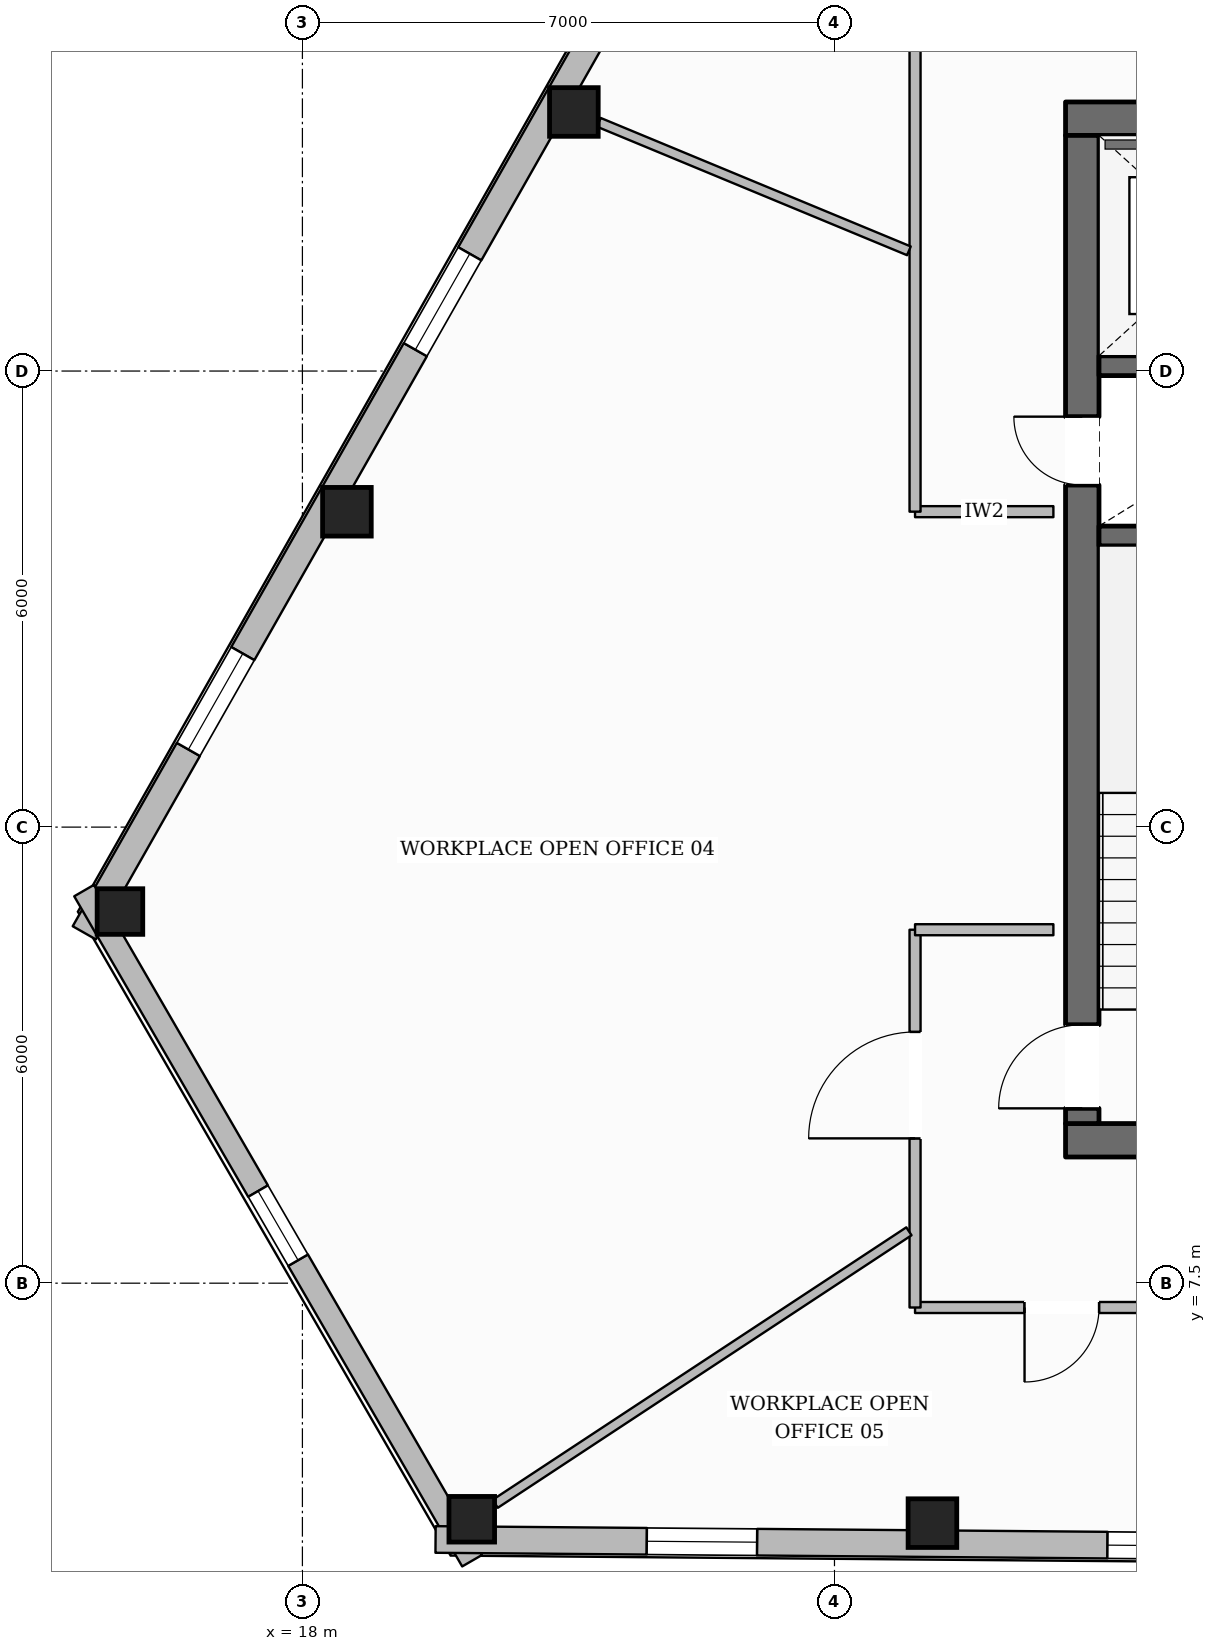
"""IFC4 building model, lengths in metres.
Left out: names, types, materials, properties, quantities, classifications, styles, units other than length and angle.
Written with IfcOpenShell. Run it as: python <this file> out.ifc"""

import sys

from ifc_helpers import new_model, si_unit, direction, frame, frame_2d, origin, origin_2d, place, context, subcontext, project, spatial, rectangle, hollow_rectangle, extrude, element, fill, save


model = new_model("IFC4")
c1 = context("Model", 3, precision=1e-05, world=origin(), true_north=direction((0.0, 1.0)))
c2 = subcontext(c1, "Body", "Model", "MODEL_VIEW")
j1 = project(units=[si_unit("LENGTHUNIT", "METRE"), si_unit("PLANEANGLEUNIT", "RADIAN")], contexts=[c1])
p1 = place(None, origin())
s1 = spatial("IfcSite", under=j1, at=p1, CompositionType="ELEMENT")
p2 = place(p1, origin())
s2 = spatial("IfcBuilding", under=s1, at=p2, CompositionType="ELEMENT")
p3 = place(p2, frame((0.0, 0.0, 176.55)))
s3 = spatial("IfcBuildingStorey", under=s2, at=p3, CompositionType="ELEMENT", Elevation=176.55)
p4 = place(p3, frame((28.04, 9.38, 0.0), z_axis=(0.0, 0.0, 1.0), x_axis=(1.0, 0.0, 0.0)))
e1 = element("IfcWall", 1, at=p4, inside=s3, PredefinedType="SOLIDWALL", context=c2, shape_type="SweptSolid", body=[
    extrude(rectangle(XDim=19.92, YDim=0.44, at=frame_2d((9.96, 0.0))), origin(), (0.0, 0.0, 1.0), 3.6),
])
p5 = place(p4, frame((10.46, 0.0, 0.0)))
e2 = element("IfcOpeningElement", 2, at=p5, cuts=e1, PredefinedType="OPENING", context=c2, shape_type="SweptSolid", body=[
    extrude(rectangle(XDim=1.4, YDim=2.2, at=frame_2d((0.7, 1.1))), frame((0.0, 0.23, 0.0), z_axis=(0.0, -1.0, 0.0), x_axis=(1.0, 0.0, 0.0)), (0.0, 0.0, 1.0), 0.46),
])
p6 = place(p3, frame((28.04, 22.82, 0.0), z_axis=(0.0, 0.0, 1.0), x_axis=(1.0, 0.0, 0.0)))
e3 = element("IfcWall", 3, at=p6, inside=s3, PredefinedType="SOLIDWALL", context=c2, shape_type="SweptSolid", body=[
    extrude(rectangle(XDim=19.92, YDim=0.44, at=frame_2d((9.96, 0.0))), origin(), (0.0, 0.0, 1.0), 3.6),
])
p7 = place(p6, frame((6.235, 0.0, 0.0)))
e4 = element("IfcOpeningElement", 4, at=p7, cuts=e3, PredefinedType="OPENING", context=c2, shape_type="SweptSolid", body=[
    extrude(rectangle(XDim=1.05, YDim=2.15, at=frame_2d((0.525, 1.075))), frame((0.0, 0.23, 0.0), z_axis=(0.0, -1.0, 0.0), x_axis=(1.0, 0.0, 0.0)), (0.0, 0.0, 1.0), 0.46),
])
p8 = place(p6, frame((12.635, 0.0, 0.0)))
e5 = element("IfcOpeningElement", 5, at=p8, cuts=e3, PredefinedType="OPENING", context=c2, shape_type="SweptSolid", body=[
    extrude(rectangle(XDim=1.05, YDim=2.15, at=frame_2d((0.525, 1.075))), frame((0.0, 0.23, 0.0), z_axis=(0.0, -1.0, 0.0), x_axis=(1.0, 0.0, 0.0)), (0.0, 0.0, 1.0), 0.46),
])
p9 = place(p3, frame((28.26, 9.6, 0.0), z_axis=(0.0, 0.0, 1.0), x_axis=(0.0, 1.0, 0.0)))
e6 = element("IfcWall", 6, at=p9, inside=s3, PredefinedType="SOLIDWALL", context=c2, shape_type="SweptSolid", body=[
    extrude(rectangle(XDim=13.0, YDim=0.44, at=frame_2d((6.5, 0.0))), origin(), (0.0, 0.0, 1.0), 3.6),
])
p10 = place(p9, frame((0.2, 0.0, 0.0)))
e7 = element("IfcOpeningElement", 7, at=p10, cuts=e6, PredefinedType="OPENING", context=c2, shape_type="SweptSolid", body=[
    extrude(rectangle(XDim=1.1, YDim=2.15, at=frame_2d((0.55, 1.075))), frame((0.0, 0.23, 0.0), z_axis=(0.0, -1.0, 0.0), x_axis=(1.0, 0.0, 0.0)), (0.0, 0.0, 1.0), 0.46),
])
p11 = place(p9, frame((8.4, 0.0, 0.0)))
e8 = element("IfcOpeningElement", 8, at=p11, cuts=e6, PredefinedType="OPENING", context=c2, shape_type="SweptSolid", body=[
    extrude(rectangle(XDim=0.9, YDim=2.1, at=frame_2d((0.45, 1.05))), frame((0.0, 0.23, 0.0), z_axis=(0.0, -1.0, 0.0), x_axis=(1.0, 0.0, 0.0)), (0.0, 0.0, 1.0), 0.46),
])
for number, where, z_axis, x_axis in (
    (9, (28.48, 17.33, 0.0), (0.0, 0.0, 1.0), (1.0, 0.0, 0.0)),
    (10, (28.48, 19.57, 0.0), (0.0, 0.0, 1.0), (1.0, 0.0, 0.0)),
):
    element("IfcWall", number, at=place(p3, frame(where, z_axis=z_axis, x_axis=x_axis)), inside=s3, PredefinedType="SHEAR", context=c2, shape_type="SweptSolid", body=[
        extrude(rectangle(XDim=3.2, YDim=0.26, at=frame_2d((1.6, 0.0))), origin(), (0.0, 0.0, 1.0), 3.6),
    ])
for number, where, z_axis, x_axis in (
    (11, (21.572, 22.908, 0.0), (0.0, 0.0, 1.0), (1.0, 0.0, 0.0)),
    (12, (18.586, 17.649, 0.0), (0.0, 0.0, 1.0), (1.0, 0.0, 0.0)),
):
    element("IfcColumn", number, at=place(p3, frame(where, z_axis=z_axis, x_axis=x_axis)), inside=s3, PredefinedType="COLUMN", context=c2, shape_type="SweptSolid", body=[
        extrude(hollow_rectangle(XDim=0.64, YDim=0.64, WallThickness=0.028, at=origin_2d()), origin(), (0.0, 0.0, 1.0), 3.6),
    ])
for number, where, z_axis, x_axis in (
    (13, (15.6, 12.389, 0.0), (0.0, 0.0, 1.0), (1.0, 0.0, 0.0)),
    (14, (20.228, 4.394, 0.0), (0.0, 0.0, 1.0), (1.0, 0.0, 0.0)),
):
    element("IfcColumn", number, at=place(p3, frame(where, z_axis=z_axis, x_axis=x_axis)), inside=s3, PredefinedType="COLUMN", context=c2, shape_type="SweptSolid", body=[
        extrude(hollow_rectangle(XDim=0.6, YDim=0.6, WallThickness=0.028, at=origin_2d()), origin(), (0.0, 0.0, 1.0), 3.6),
    ])
p12 = place(p3, frame((26.289, 4.343, 0.0), z_axis=(0.0, 0.0, 1.0), x_axis=(1.0, 0.0, 0.0)))
e15 = element("IfcColumn", 15, at=p12, inside=s3, PredefinedType="COLUMN", context=c2, shape_type="SweptSolid", body=[
    extrude(hollow_rectangle(XDim=0.64, YDim=0.64, WallThickness=0.028, at=origin_2d()), origin(), (0.0, 0.0, 1.0), 3.6),
])
p13 = place(p3, frame((15.13, 12.109, 0.0), z_axis=(0.0, 0.0, 1.0), x_axis=(0.493717133856, 0.869622557054, 0.0)))
e16 = element("IfcWall", 16, at=p13, inside=s3, PredefinedType="STANDARD", context=c2, shape_type="SweptSolid", body=[
    extrude(rectangle(XDim=37.245, YDim=0.35, at=frame_2d((18.623, 0.0))), origin(), (0.0, 0.0, 1.0), 3.132),
])
p14 = place(p13, frame((27.334, 0.0, 0.0)))
e17 = element("IfcOpeningElement", 17, at=p14, cuts=e16, PredefinedType="OPENING", context=c2, shape_type="SweptSolid", body=[
    extrude(rectangle(XDim=1.0, YDim=2.2, at=frame_2d((0.5, 1.1))), frame((0.0, 0.185, 0.0), z_axis=(0.0, -1.0, 0.0), x_axis=(1.0, 0.0, 0.0)), (0.0, 0.0, 1.0), 0.37),
])
p15 = place(p13, frame((33.014, 0.0, 0.65)))
e18 = element("IfcOpeningElement", 18, at=p15, cuts=e16, PredefinedType="OPENING", context=c2, shape_type="SweptSolid", body=[
    extrude(rectangle(XDim=1.45, YDim=1.75, at=frame_2d((0.725, 0.875))), frame((0.0, 0.185, 0.0), z_axis=(0.0, -1.0, 0.0), x_axis=(1.0, 0.0, 0.0)), (0.0, 0.0, 1.0), 0.37),
])
p16 = place(p13, frame((20.918, 0.0, 0.65)))
e19 = element("IfcOpeningElement", 19, at=p16, cuts=e16, PredefinedType="OPENING", context=c2, shape_type="SweptSolid", body=[
    extrude(rectangle(XDim=1.45, YDim=1.75, at=frame_2d((0.725, 0.875))), frame((0.0, 0.185, 0.0), z_axis=(0.0, -1.0, 0.0), x_axis=(1.0, 0.0, 0.0)), (0.0, 0.0, 1.0), 0.37),
])
p17 = place(p13, frame((8.822, 0.0, 0.65)))
e20 = element("IfcOpeningElement", 20, at=p17, cuts=e16, PredefinedType="OPENING", context=c2, shape_type="SweptSolid", body=[
    extrude(rectangle(XDim=1.45, YDim=1.75, at=frame_2d((0.725, 0.875))), frame((0.0, 0.185, 0.0), z_axis=(0.0, -1.0, 0.0), x_axis=(1.0, 0.0, 0.0)), (0.0, 0.0, 1.0), 0.37),
])
p18 = place(p13, frame((2.774, 0.0, 0.65)))
e21 = element("IfcOpeningElement", 21, at=p18, cuts=e16, PredefinedType="OPENING", context=c2, shape_type="SweptSolid", body=[
    extrude(rectangle(XDim=1.45, YDim=1.75, at=frame_2d((0.725, 0.875))), frame((0.0, 0.185, 0.0), z_axis=(0.0, -1.0, 0.0), x_axis=(1.0, 0.0, 0.0)), (0.0, 0.0, 1.0), 0.37),
])
p19 = place(p3, frame((20.232, 3.849, 0.0), z_axis=(0.0, 0.0, 1.0), x_axis=(-0.501026823905, 0.865431754517, 0.0)))
e22 = element("IfcWall", 22, at=p19, inside=s3, PredefinedType="STANDARD", context=c2, shape_type="SweptSolid", body=[
    extrude(rectangle(XDim=10.188, YDim=0.3, at=frame_2d((5.094, 0.0))), origin(), (0.0, 0.0, 1.0), 3.132),
])
p20 = place(p19, frame((4.569, 0.0, 0.65)))
e23 = element("IfcOpeningElement", 23, at=p20, cuts=e22, PredefinedType="OPENING", context=c2, shape_type="SweptSolid", body=[
    extrude(rectangle(XDim=1.05, YDim=1.7, at=frame_2d((0.525, 0.85))), frame((0.0, 0.16, 0.0), z_axis=(0.0, -1.0, 0.0), x_axis=(1.0, 0.0, 0.0)), (0.0, 0.0, 1.0), 0.32),
])
p21 = place(p3, frame((57.072, 3.814, 0.0), z_axis=(0.0, 0.0, 1.0), x_axis=(-0.999964560475, 0.008418895034, 0.0)))
e24 = element("IfcWall", 24, at=p21, inside=s3, PredefinedType="STANDARD", context=c2, shape_type="SweptSolid", body=[
    extrude(rectangle(XDim=37.322, YDim=0.35, at=frame_2d((18.661, 0.0))), origin(), (0.0, 0.0, 1.0), 3.132),
])
p22 = place(p21, frame((33.092, 0.0, 0.65)))
e25 = element("IfcOpeningElement", 25, at=p22, cuts=e24, PredefinedType="OPENING", context=c2, shape_type="SweptSolid", body=[
    extrude(rectangle(XDim=1.45, YDim=1.75, at=frame_2d((0.725, 0.875))), frame((0.0, 0.185, 0.0), z_axis=(0.0, -1.0, 0.0), x_axis=(1.0, 0.0, 0.0)), (0.0, 0.0, 1.0), 0.37),
])
p23 = place(p21, frame((27.031, 0.0, 0.65)))
e26 = element("IfcOpeningElement", 26, at=p23, cuts=e24, PredefinedType="OPENING", context=c2, shape_type="SweptSolid", body=[
    extrude(rectangle(XDim=1.45, YDim=1.75, at=frame_2d((0.725, 0.875))), frame((0.0, 0.185, 0.0), z_axis=(0.0, -1.0, 0.0), x_axis=(1.0, 0.0, 0.0)), (0.0, 0.0, 1.0), 0.37),
])
p24 = place(p21, frame((20.97, 0.0, 0.65)))
e27 = element("IfcOpeningElement", 27, at=p24, cuts=e24, PredefinedType="OPENING", context=c2, shape_type="SweptSolid", body=[
    extrude(rectangle(XDim=1.45, YDim=1.75, at=frame_2d((0.725, 0.875))), frame((0.0, 0.185, 0.0), z_axis=(0.0, -1.0, 0.0), x_axis=(1.0, 0.0, 0.0)), (0.0, 0.0, 1.0), 0.37),
])
p25 = place(p21, frame((8.849, 0.0, 0.65)))
e28 = element("IfcOpeningElement", 28, at=p25, cuts=e24, PredefinedType="OPENING", context=c2, shape_type="SweptSolid", body=[
    extrude(rectangle(XDim=1.45, YDim=1.75, at=frame_2d((0.725, 0.875))), frame((0.0, 0.185, 0.0), z_axis=(0.0, -1.0, 0.0), x_axis=(1.0, 0.0, 0.0)), (0.0, 0.0, 1.0), 0.37),
])
p26 = place(p21, frame((2.788, 0.0, 0.65)))
e29 = element("IfcOpeningElement", 29, at=p26, cuts=e24, PredefinedType="OPENING", context=c2, shape_type="SweptSolid", body=[
    extrude(rectangle(XDim=1.45, YDim=1.75, at=frame_2d((0.725, 0.875))), frame((0.0, 0.185, 0.0), z_axis=(0.0, -1.0, 0.0), x_axis=(1.0, 0.0, 0.0)), (0.0, 0.0, 1.0), 0.37),
])
p27 = place(p3, frame((27.88, 17.65, 0.0), z_axis=(0.0, 0.0, 1.0), x_axis=(-1.0, 0.0, 0.0)))
e30 = element("IfcWall", 30, at=p27, inside=s3, PredefinedType="PARTITIONING", context=c2, shape_type="SweptSolid", body=[
    extrude(rectangle(XDim=1.82, YDim=0.145, at=frame_2d((0.91, 0.0))), origin(), (0.0, 0.0, 1.0), 3.141),
])
p28 = place(p3, frame((26.06, 17.65, 0.0), z_axis=(0.0, 0.0, 1.0), x_axis=(0.0, 1.0, 0.0)))
e31 = element("IfcWall", 31, at=p28, inside=s3, PredefinedType="PARTITIONING", context=c2, shape_type="SweptSolid", body=[
    extrude(rectangle(XDim=7.37, YDim=0.145, at=frame_2d((3.685, 0.0))), origin(), (0.0, 0.0, 1.0), 3.339),
])
p29 = place(p3, frame((49.94, 7.18, 0.0), z_axis=(0.0, 0.0, 1.0), x_axis=(-1.0, 0.0, 0.0)))
e32 = element("IfcWall", 32, at=p29, inside=s3, PredefinedType="PARTITIONING", context=c2, shape_type="SweptSolid", body=[
    extrude(rectangle(XDim=23.88, YDim=0.145, at=frame_2d((11.94, 0.0))), origin(), (0.0, 0.0, 1.0), 3.6),
])
p30 = place(p29, frame((18.5, 0.0, 0.0)))
e33 = element("IfcOpeningElement", 33, at=p30, cuts=e32, PredefinedType="OPENING", context=c2, shape_type="SweptSolid", body=[
    extrude(rectangle(XDim=0.88, YDim=2.1, at=frame_2d((0.44, 1.05))), frame((0.0, 0.083, 0.0), z_axis=(0.0, -1.0, 0.0), x_axis=(1.0, 0.0, 0.0)), (0.0, 0.0, 1.0), 0.165),
])
p31 = place(p29, frame((15.98, 0.0, 0.0)))
e34 = element("IfcOpeningElement", 34, at=p31, cuts=e32, PredefinedType="OPENING", context=c2, shape_type="SweptSolid", body=[
    extrude(rectangle(XDim=0.88, YDim=2.1, at=frame_2d((0.44, 1.05))), frame((0.0, 0.083, 0.0), z_axis=(0.0, -1.0, 0.0), x_axis=(1.0, 0.0, 0.0)), (0.0, 0.0, 1.0), 0.165),
])
p32 = place(p29, frame((13.52, 0.0, 0.0)))
e35 = element("IfcOpeningElement", 35, at=p32, cuts=e32, PredefinedType="OPENING", context=c2, shape_type="SweptSolid", body=[
    extrude(rectangle(XDim=0.96, YDim=2.1, at=frame_2d((0.48, 1.05))), frame((0.0, 0.083, 0.0), z_axis=(0.0, -1.0, 0.0), x_axis=(1.0, 0.0, 0.0)), (0.0, 0.0, 1.0), 0.165),
])
p33 = place(p29, frame((21.459, 0.0, 0.0)))
e36 = element("IfcOpeningElement", 36, at=p33, cuts=e32, PredefinedType="OPENING", context=c2, shape_type="SweptSolid", body=[
    extrude(rectangle(XDim=0.98, YDim=2.15, at=frame_2d((0.49, 1.075))), frame((0.0, 0.083, 0.0), z_axis=(0.0, -1.0, 0.0), x_axis=(1.0, 0.0, 0.0)), (0.0, 0.0, 1.0), 0.165),
])
p34 = place(p29, frame((9.471, 0.0, 0.0)))
e37 = element("IfcOpeningElement", 37, at=p34, cuts=e32, PredefinedType="OPENING", context=c2, shape_type="SweptSolid", body=[
    extrude(rectangle(XDim=0.98, YDim=2.15, at=frame_2d((0.49, 1.075))), frame((0.0, 0.083, 0.0), z_axis=(0.0, -1.0, 0.0), x_axis=(1.0, 0.0, 0.0)), (0.0, 0.0, 1.0), 0.165),
])
p35 = place(p3, frame((26.06, 7.18, 0.0), z_axis=(0.0, 0.0, 1.0), x_axis=(0.0, 1.0, 0.0)))
e38 = element("IfcWall", 38, at=p35, inside=s3, PredefinedType="PARTITIONING", context=c2, shape_type="SweptSolid", body=[
    extrude(rectangle(XDim=4.97, YDim=0.145, at=frame_2d((2.485, 0.0))), origin(), (0.0, 0.0, 1.0), 3.6),
])
p36 = place(p35, frame((2.225, 0.0, 0.0)))
e39 = element("IfcOpeningElement", 39, at=p36, cuts=e38, PredefinedType="OPENING", context=c2, shape_type="SweptSolid", body=[
    extrude(rectangle(XDim=1.4, YDim=2.2, at=frame_2d((0.7, 1.1))), frame((0.0, 0.083, 0.0), z_axis=(0.0, -1.0, 0.0), x_axis=(1.0, 0.0, 0.0)), (0.0, 0.0, 1.0), 0.165),
])
p37 = place(p3, frame((26.06, 12.15, 0.0), z_axis=(0.0, 0.0, 1.0), x_axis=(1.0, 0.0, 0.0)))
e40 = element("IfcWall", 40, at=p37, inside=s3, PredefinedType="PARTITIONING", context=c2, shape_type="SweptSolid", body=[
    extrude(rectangle(XDim=1.82, YDim=0.145, at=frame_2d((0.91, 0.0))), origin(), (0.0, 0.0, 1.0), 3.6),
])
p38 = place(p3, frame((25.979, 21.082, 0.0), z_axis=(0.0, 0.0, 1.0), x_axis=(-0.923827478878, 0.382809076785, 0.0)))
e41 = element("IfcWall", 41, at=p38, inside=s3, PredefinedType="PARTITIONING", context=c2, shape_type="SweptSolid", body=[
    extrude(rectangle(XDim=4.417, YDim=0.125, at=frame_2d((2.208, 0.0))), origin(), (0.0, 0.0, 1.0), 3.6),
])
p39 = place(p3, frame((25.979, 8.182, 0.0), z_axis=(0.0, 0.0, 1.0), x_axis=(-0.835114630122, -0.550075953443, 0.0)))
e42 = element("IfcWall", 42, at=p39, inside=s3, PredefinedType="PARTITIONING", context=c2, shape_type="SweptSolid", body=[
    extrude(rectangle(XDim=6.518, YDim=0.125, at=frame_2d((3.259, 0.0))), origin(), (0.0, 0.0, 1.0), 3.141),
])
p40 = place(p17, origin())
e43 = element("IfcWindow", 43, at=p40, inside=s3, PartitioningType="SINGLE_PANEL", PredefinedType="WINDOW", context=c2, shape_type="SweptSolid", body=[
    extrude(rectangle(XDim=1.45, YDim=1.75, at=frame_2d((0.725, 0.875))), frame((0.0, 0.03, 0.0), z_axis=(0.0, -1.0, 0.0), x_axis=(1.0, 0.0, 0.0)), (0.0, 0.0, 1.0), 0.06),
])
fill(e20, e43)
p41 = place(p18, origin())
e44 = element("IfcWindow", 44, at=p41, inside=s3, PartitioningType="SINGLE_PANEL", PredefinedType="WINDOW", context=c2, shape_type="SweptSolid", body=[
    extrude(rectangle(XDim=1.45, YDim=1.75, at=frame_2d((0.725, 0.875))), frame((0.0, 0.03, 0.0), z_axis=(0.0, -1.0, 0.0), x_axis=(1.0, 0.0, 0.0)), (0.0, 0.0, 1.0), 0.06),
])
fill(e21, e44)
p42 = place(p22, origin())
e45 = element("IfcWindow", 45, at=p42, inside=s3, PartitioningType="SINGLE_PANEL", PredefinedType="WINDOW", context=c2, shape_type="SweptSolid", body=[
    extrude(rectangle(XDim=1.45, YDim=1.75, at=frame_2d((0.725, 0.875))), frame((0.0, 0.03, 0.0), z_axis=(0.0, -1.0, 0.0), x_axis=(1.0, 0.0, 0.0)), (0.0, 0.0, 1.0), 0.06),
])
fill(e25, e45)
p43 = place(p23, origin())
e46 = element("IfcWindow", 46, at=p43, inside=s3, PartitioningType="SINGLE_PANEL", PredefinedType="WINDOW", context=c2, shape_type="SweptSolid", body=[
    extrude(rectangle(XDim=1.45, YDim=1.75, at=frame_2d((0.725, 0.875))), frame((0.0, 0.03, 0.0), z_axis=(0.0, -1.0, 0.0), x_axis=(1.0, 0.0, 0.0)), (0.0, 0.0, 1.0), 0.06),
])
fill(e26, e46)
p44 = place(p20, origin())
e47 = element("IfcWindow", 47, at=p44, inside=s3, PartitioningType="SINGLE_PANEL", PredefinedType="WINDOW", context=c2, shape_type="SweptSolid", body=[
    extrude(rectangle(XDim=1.05, YDim=1.7, at=frame_2d((0.525, 0.85))), frame((0.0, 0.03, 0.0), z_axis=(0.0, -1.0, 0.0), x_axis=(1.0, 0.0, 0.0)), (0.0, 0.0, 1.0), 0.06),
])
fill(e23, e47)
p45 = place(p10, origin())
e48 = element("IfcDoor", 48, at=p45, inside=s3, OperationType="SINGLE_SWING_LEFT", PredefinedType="DOOR", context=c2, shape_type="SweptSolid", body=[
    extrude(rectangle(XDim=1.1, YDim=2.15, at=frame_2d((0.55, 1.075))), frame((0.0, 0.025, 0.0), z_axis=(0.0, -1.0, 0.0), x_axis=(1.0, 0.0, 0.0)), (0.0, 0.0, 1.0), 0.05),
])
fill(e7, e48)
p46 = place(p11, origin())
e49 = element("IfcDoor", 49, at=p46, inside=s3, OperationType="SINGLE_SWING_RIGHT", PredefinedType="DOOR", context=c2, shape_type="SweptSolid", body=[
    extrude(rectangle(XDim=0.9, YDim=2.1, at=frame_2d((0.45, 1.05))), frame((0.0, 0.025, 0.0), z_axis=(0.0, -1.0, 0.0), x_axis=(1.0, 0.0, 0.0)), (0.0, 0.0, 1.0), 0.05),
])
fill(e8, e49)
p47 = place(p36, origin())
e50 = element("IfcDoor", 50, at=p47, inside=s3, OperationType="SINGLE_SWING_LEFT", PredefinedType="DOOR", context=c2, shape_type="SweptSolid", body=[
    extrude(rectangle(XDim=1.4, YDim=2.2, at=frame_2d((0.7, 1.1))), frame((0.0, 0.025, 0.0), z_axis=(0.0, -1.0, 0.0), x_axis=(1.0, 0.0, 0.0)), (0.0, 0.0, 1.0), 0.05),
])
fill(e39, e50)
p48 = place(p33, origin())
e51 = element("IfcDoor", 51, at=p48, inside=s3, OperationType="SINGLE_SWING_RIGHT", PredefinedType="DOOR", context=c2, shape_type="SweptSolid", body=[
    extrude(rectangle(XDim=0.98, YDim=2.15, at=frame_2d((0.49, 1.075))), frame((0.0, 0.025, 0.0), z_axis=(0.0, -1.0, 0.0), x_axis=(1.0, 0.0, 0.0)), (0.0, 0.0, 1.0), 0.05),
])
fill(e36, e51)
save(model, sys.argv[1])
